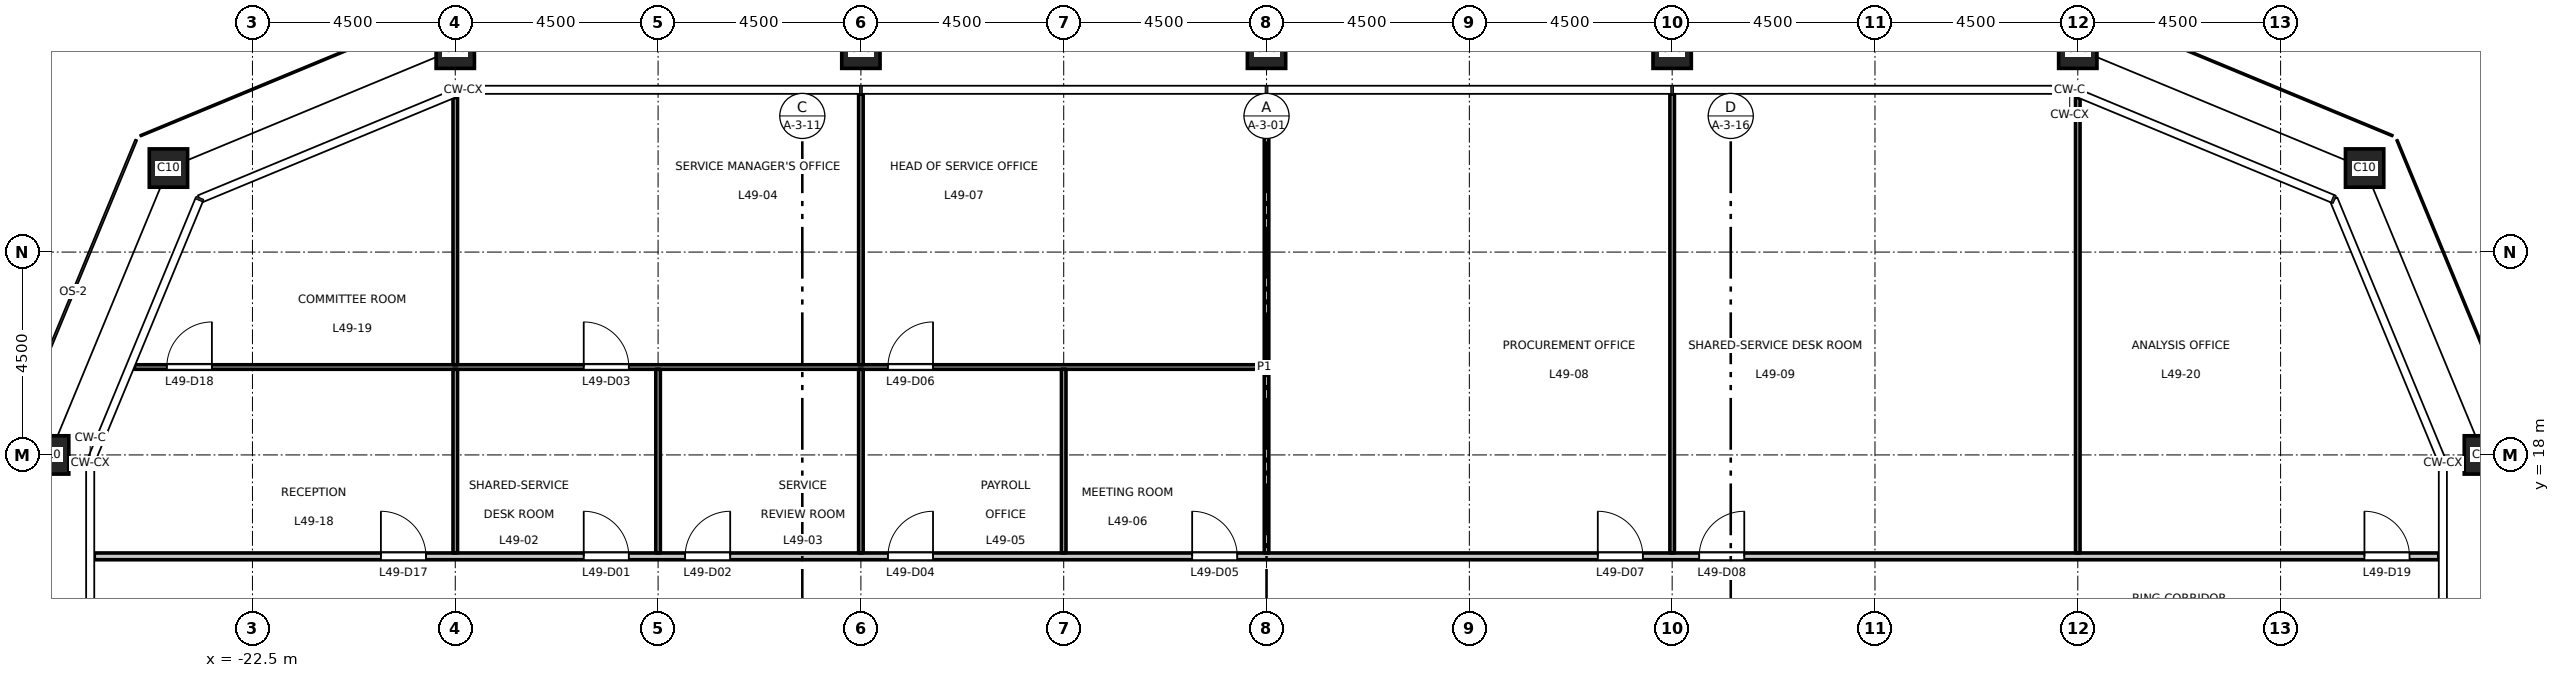
"""IFC4 building model, lengths in metres.
Left out: names, types, materials, properties, quantities, classifications, styles, units other than length and angle.
Written with IfcOpenShell. Run it as: python <this file> out.ifc"""

import sys

from ifc_helpers import new_model, si_unit, direction, frame, frame_2d, origin, origin_2d, place, context, subcontext, project, spatial, rectangle, hollow_rectangle, extrude, element, fill, save


model = new_model("IFC4")
c1 = context("Model", 3, precision=1e-05, world=origin(), true_north=direction((0.0, 1.0)))
c2 = subcontext(c1, "Body", "Model", "MODEL_VIEW")
j1 = project(units=[si_unit("LENGTHUNIT", "METRE"), si_unit("PLANEANGLEUNIT", "RADIAN")], contexts=[c1])
p1 = place(None, origin())
s1 = spatial("IfcSite", under=j1, at=p1, CompositionType="ELEMENT")
p2 = place(p1, origin())
s2 = spatial("IfcBuilding", under=s1, at=p2, CompositionType="ELEMENT")
p3 = place(p2, frame((0.0, 0.0, 228.7)))
s3 = spatial("IfcBuildingStorey", under=s2, at=p3, CompositionType="ELEMENT", Elevation=228.7)
for number, where, z_axis, x_axis in (
    (1, (27.0, 18.0, 0.0), (0.0, 0.0, 1.0), (1.0, 0.0, 0.0)),
    (2, (24.364, 24.364, 0.0), (0.0, 0.0, 1.0), (1.0, 0.0, 0.0)),
    (3, (18.0, 27.0, 0.0), (0.0, 0.0, 1.0), (1.0, 0.0, 0.0)),
    (4, (9.0, 27.0, 0.0), (0.0, 0.0, 1.0), (1.0, 0.0, 0.0)),
    (5, (0.0, 27.0, 0.0), (0.0, 0.0, 1.0), (1.0, 0.0, 0.0)),
    (6, (-9.0, 27.0, 0.0), (0.0, 0.0, 1.0), (1.0, 0.0, 0.0)),
    (7, (-18.0, 27.0, 0.0), (0.0, 0.0, 1.0), (1.0, 0.0, 0.0)),
    (8, (-24.364, 24.364, 0.0), (0.0, 0.0, 1.0), (1.0, 0.0, 0.0)),
    (9, (-27.0, 18.0, 0.0), (0.0, 0.0, 1.0), (1.0, 0.0, 0.0)),
):
    element("IfcColumn", number, at=place(p3, frame(where, z_axis=z_axis, x_axis=x_axis)), inside=s3, PredefinedType="COLUMN", context=c2, shape_type="SweptSolid", body=[
        extrude(hollow_rectangle(XDim=0.85, YDim=0.85, WallThickness=0.05, at=origin_2d()), origin(), (0.0, 0.0, 1.0), 4.5),
    ])
p4 = place(p3, frame((-26.01, 15.75, 0.0), z_axis=(0.0, 0.0, 1.0), x_axis=(1.0, 0.0, 0.0)))
e10 = element("IfcWall", 10, at=p4, inside=s3, PredefinedType="PARTITIONING", context=c2, shape_type="SweptSolid", body=[
    extrude(rectangle(XDim=52.02, YDim=0.15, at=frame_2d((26.01, 0.0))), origin(), (0.0, 0.0, 1.0), 4.35),
])
p5 = place(p4, frame((10.86, 0.0, 0.0)))
e11 = element("IfcOpeningElement", 11, at=p5, cuts=e10, PredefinedType="OPENING", context=c2, shape_type="SweptSolid", body=[
    extrude(rectangle(XDim=1.0, YDim=2.1, at=frame_2d((0.5, 1.05))), frame((0.0, 0.085, 0.0), z_axis=(0.0, -1.0, 0.0), x_axis=(1.0, 0.0, 0.0)), (0.0, 0.0, 1.0), 0.17),
])
p6 = place(p4, frame((13.11, 0.0, 0.0)))
e12 = element("IfcOpeningElement", 12, at=p6, cuts=e10, PredefinedType="OPENING", context=c2, shape_type="SweptSolid", body=[
    extrude(rectangle(XDim=1.0, YDim=2.1, at=frame_2d((0.5, 1.05))), frame((0.0, 0.085, 0.0), z_axis=(0.0, -1.0, 0.0), x_axis=(1.0, 0.0, 0.0)), (0.0, 0.0, 1.0), 0.17),
])
p7 = place(p4, frame((17.61, 0.0, 0.0)))
e13 = element("IfcOpeningElement", 13, at=p7, cuts=e10, PredefinedType="OPENING", context=c2, shape_type="SweptSolid", body=[
    extrude(rectangle(XDim=1.0, YDim=2.1, at=frame_2d((0.5, 1.05))), frame((0.0, 0.085, 0.0), z_axis=(0.0, -1.0, 0.0), x_axis=(1.0, 0.0, 0.0)), (0.0, 0.0, 1.0), 0.17),
])
p8 = place(p4, frame((24.36, 0.0, 0.0)))
e14 = element("IfcOpeningElement", 14, at=p8, cuts=e10, PredefinedType="OPENING", context=c2, shape_type="SweptSolid", body=[
    extrude(rectangle(XDim=1.0, YDim=2.1, at=frame_2d((0.5, 1.05))), frame((0.0, 0.085, 0.0), z_axis=(0.0, -1.0, 0.0), x_axis=(1.0, 0.0, 0.0)), (0.0, 0.0, 1.0), 0.17),
])
p9 = place(p4, frame((33.36, 0.0, 0.0)))
e15 = element("IfcOpeningElement", 15, at=p9, cuts=e10, PredefinedType="OPENING", context=c2, shape_type="SweptSolid", body=[
    extrude(rectangle(XDim=1.0, YDim=2.1, at=frame_2d((0.5, 1.05))), frame((0.0, 0.085, 0.0), z_axis=(0.0, -1.0, 0.0), x_axis=(1.0, 0.0, 0.0)), (0.0, 0.0, 1.0), 0.17),
])
p10 = place(p4, frame((35.61, 0.0, 0.0)))
e16 = element("IfcOpeningElement", 16, at=p10, cuts=e10, PredefinedType="OPENING", context=c2, shape_type="SweptSolid", body=[
    extrude(rectangle(XDim=1.0, YDim=2.1, at=frame_2d((0.5, 1.05))), frame((0.0, 0.085, 0.0), z_axis=(0.0, -1.0, 0.0), x_axis=(1.0, 0.0, 0.0)), (0.0, 0.0, 1.0), 0.17),
])
p11 = place(p4, frame((6.36, 0.0, 0.0)))
e17 = element("IfcOpeningElement", 17, at=p11, cuts=e10, PredefinedType="OPENING", context=c2, shape_type="SweptSolid", body=[
    extrude(rectangle(XDim=1.0, YDim=2.1, at=frame_2d((0.5, 1.05))), frame((0.0, 0.085, 0.0), z_axis=(0.0, -1.0, 0.0), x_axis=(1.0, 0.0, 0.0)), (0.0, 0.0, 1.0), 0.17),
])
p12 = place(p4, frame((50.37, 0.0, 0.0)))
e18 = element("IfcOpeningElement", 18, at=p12, cuts=e10, PredefinedType="OPENING", context=c2, shape_type="SweptSolid", body=[
    extrude(rectangle(XDim=1.0, YDim=2.1, at=frame_2d((0.5, 1.05))), frame((0.0, 0.085, 0.0), z_axis=(0.0, -1.0, 0.0), x_axis=(1.0, 0.0, 0.0)), (0.0, 0.0, 1.0), 0.17),
])
p13 = place(p3, frame((-25.121, 19.95, 0.0), z_axis=(0.0, 0.0, 1.0), x_axis=(1.0, 0.0, 0.0)))
e19 = element("IfcWall", 19, at=p13, inside=s3, PredefinedType="PARTITIONING", context=c2, shape_type="SweptSolid", body=[
    extrude(rectangle(XDim=25.071, YDim=0.1, at=frame_2d((12.536, 0.0))), origin(), (0.0, 0.0, 1.0), 4.35),
])
p14 = place(p13, frame((9.971, 0.0, 0.0)))
e20 = element("IfcOpeningElement", 20, at=p14, cuts=e19, PredefinedType="OPENING", context=c2, shape_type="SweptSolid", body=[
    extrude(rectangle(XDim=1.0, YDim=2.1, at=frame_2d((0.5, 1.05))), frame((0.0, 0.06, 0.0), z_axis=(0.0, -1.0, 0.0), x_axis=(1.0, 0.0, 0.0)), (0.0, 0.0, 1.0), 0.12),
])
p15 = place(p13, frame((16.721, 0.0, 0.0)))
e21 = element("IfcOpeningElement", 21, at=p15, cuts=e19, PredefinedType="OPENING", context=c2, shape_type="SweptSolid", body=[
    extrude(rectangle(XDim=1.0, YDim=2.1, at=frame_2d((0.5, 1.05))), frame((0.0, 0.06, 0.0), z_axis=(0.0, -1.0, 0.0), x_axis=(1.0, 0.0, 0.0)), (0.0, 0.0, 1.0), 0.12),
])
p16 = place(p13, frame((0.721, 0.0, 0.0)))
e22 = element("IfcOpeningElement", 22, at=p16, cuts=e19, PredefinedType="OPENING", context=c2, shape_type="SweptSolid", body=[
    extrude(rectangle(XDim=1.0, YDim=2.1, at=frame_2d((0.5, 1.05))), frame((0.0, 0.06, 0.0), z_axis=(0.0, -1.0, 0.0), x_axis=(1.0, 0.0, 0.0)), (0.0, 0.0, 1.0), 0.12),
])
p17 = place(p3, frame((-18.0, 15.825, 0.0), z_axis=(0.0, 0.0, 1.0), x_axis=(0.0, 1.0, 0.0)))
e23 = element("IfcWall", 23, at=p17, inside=s3, PredefinedType="PARTITIONING", context=c2, shape_type="SweptSolid", body=[
    extrude(rectangle(XDim=4.075, YDim=0.1, at=frame_2d((2.038, 0.0))), origin(), (0.0, 0.0, 1.0), 3.65),
])
p18 = place(p3, frame((-18.0, 20.0, 0.0), z_axis=(0.0, 0.0, 1.0), x_axis=(0.0, 1.0, 0.0)))
e24 = element("IfcWall", 24, at=p18, inside=s3, PredefinedType="PARTITIONING", context=c2, shape_type="SweptSolid", body=[
    extrude(rectangle(XDim=5.928, YDim=0.1, at=frame_2d((2.964, 0.0))), origin(), (0.0, 0.0, 1.0), 3.65),
])
p19 = place(p3, frame((-13.5, 15.825, 0.0), z_axis=(0.0, 0.0, 1.0), x_axis=(0.0, 1.0, 0.0)))
e25 = element("IfcWall", 25, at=p19, inside=s3, PredefinedType="PARTITIONING", context=c2, shape_type="SweptSolid", body=[
    extrude(rectangle(XDim=4.075, YDim=0.1, at=frame_2d((2.038, 0.0))), origin(), (0.0, 0.0, 1.0), 4.35),
])
p20 = place(p3, frame((-9.0, 15.825, 0.0), z_axis=(0.0, 0.0, 1.0), x_axis=(0.0, 1.0, 0.0)))
e26 = element("IfcWall", 26, at=p20, inside=s3, PredefinedType="PARTITIONING", context=c2, shape_type="SweptSolid", body=[
    extrude(rectangle(XDim=4.075, YDim=0.1, at=frame_2d((2.038, 0.0))), origin(), (0.0, 0.0, 1.0), 3.65),
])
p21 = place(p3, frame((-9.0, 20.0, 0.0), z_axis=(0.0, 0.0, 1.0), x_axis=(0.0, 1.0, 0.0)))
e27 = element("IfcWall", 27, at=p21, inside=s3, PredefinedType="PARTITIONING", context=c2, shape_type="SweptSolid", body=[
    extrude(rectangle(XDim=6.01, YDim=0.1, at=frame_2d((3.005, 0.0))), origin(), (0.0, 0.0, 1.0), 3.65),
])
p22 = place(p3, frame((-4.5, 15.825, 0.0), z_axis=(0.0, 0.0, 1.0), x_axis=(0.0, 1.0, 0.0)))
e28 = element("IfcWall", 28, at=p22, inside=s3, PredefinedType="PARTITIONING", context=c2, shape_type="SweptSolid", body=[
    extrude(rectangle(XDim=4.075, YDim=0.1, at=frame_2d((2.038, 0.0))), origin(), (0.0, 0.0, 1.0), 4.35),
])
p23 = place(p3, frame((0.0, 15.825, 0.0), z_axis=(0.0, 0.0, 1.0), x_axis=(0.0, 1.0, 0.0)))
e29 = element("IfcWall", 29, at=p23, inside=s3, PredefinedType="PARTITIONING", context=c2, shape_type="SweptSolid", body=[
    extrude(rectangle(XDim=10.185, YDim=0.1, at=frame_2d((5.093, 0.0))), origin(), (0.0, 0.0, 1.0), 3.55),
])
p24 = place(p3, frame((9.0, 15.825, 0.0), z_axis=(0.0, 0.0, 1.0), x_axis=(0.0, 1.0, 0.0)))
e30 = element("IfcWall", 30, at=p24, inside=s3, PredefinedType="PARTITIONING", context=c2, shape_type="SweptSolid", body=[
    extrude(rectangle(XDim=10.185, YDim=0.1, at=frame_2d((5.093, 0.0))), origin(), (0.0, 0.0, 1.0), 3.65),
])
p25 = place(p3, frame((18.0, 15.825, 0.0), z_axis=(0.0, 0.0, 1.0), x_axis=(0.0, 1.0, 0.0)))
e31 = element("IfcWall", 31, at=p25, inside=s3, PredefinedType="PARTITIONING", context=c2, shape_type="SweptSolid", body=[
    extrude(rectangle(XDim=10.103, YDim=0.1, at=frame_2d((5.052, 0.0))), origin(), (0.0, 0.0, 1.0), 3.65),
])
p26 = place(p5, origin())
e32 = element("IfcDoor", 32, at=p26, inside=s3, OperationType="SINGLE_SWING_LEFT", PredefinedType="DOOR", context=c2, shape_type="SweptSolid", body=[
    extrude(rectangle(XDim=1.0, YDim=2.1, at=frame_2d((0.5, 1.05))), frame((0.0, 0.025, 0.0), z_axis=(0.0, -1.0, 0.0), x_axis=(1.0, 0.0, 0.0)), (0.0, 0.0, 1.0), 0.05),
])
fill(e11, e32)
p27 = place(p6, origin())
e33 = element("IfcDoor", 33, at=p27, inside=s3, OperationType="SINGLE_SWING_RIGHT", PredefinedType="DOOR", context=c2, shape_type="SweptSolid", body=[
    extrude(rectangle(XDim=1.0, YDim=2.1, at=frame_2d((0.5, 1.05))), frame((0.0, 0.025, 0.0), z_axis=(0.0, -1.0, 0.0), x_axis=(1.0, 0.0, 0.0)), (0.0, 0.0, 1.0), 0.05),
])
fill(e12, e33)
p28 = place(p14, origin())
e34 = element("IfcDoor", 34, at=p28, inside=s3, OperationType="SINGLE_SWING_LEFT", PredefinedType="DOOR", context=c2, shape_type="SweptSolid", body=[
    extrude(rectangle(XDim=1.0, YDim=2.1, at=frame_2d((0.5, 1.05))), frame((0.0, 0.025, 0.0), z_axis=(0.0, -1.0, 0.0), x_axis=(1.0, 0.0, 0.0)), (0.0, 0.0, 1.0), 0.05),
])
fill(e20, e34)
p29 = place(p7, origin())
e35 = element("IfcDoor", 35, at=p29, inside=s3, OperationType="SINGLE_SWING_RIGHT", PredefinedType="DOOR", context=c2, shape_type="SweptSolid", body=[
    extrude(rectangle(XDim=1.0, YDim=2.1, at=frame_2d((0.5, 1.05))), frame((0.0, 0.025, 0.0), z_axis=(0.0, -1.0, 0.0), x_axis=(1.0, 0.0, 0.0)), (0.0, 0.0, 1.0), 0.05),
])
fill(e13, e35)
p30 = place(p8, origin())
e36 = element("IfcDoor", 36, at=p30, inside=s3, OperationType="SINGLE_SWING_LEFT", PredefinedType="DOOR", context=c2, shape_type="SweptSolid", body=[
    extrude(rectangle(XDim=1.0, YDim=2.1, at=frame_2d((0.5, 1.05))), frame((0.0, 0.025, 0.0), z_axis=(0.0, -1.0, 0.0), x_axis=(1.0, 0.0, 0.0)), (0.0, 0.0, 1.0), 0.05),
])
fill(e14, e36)
p31 = place(p15, origin())
e37 = element("IfcDoor", 37, at=p31, inside=s3, OperationType="SINGLE_SWING_RIGHT", PredefinedType="DOOR", context=c2, shape_type="SweptSolid", body=[
    extrude(rectangle(XDim=1.0, YDim=2.1, at=frame_2d((0.5, 1.05))), frame((0.0, 0.025, 0.0), z_axis=(0.0, -1.0, 0.0), x_axis=(1.0, 0.0, 0.0)), (0.0, 0.0, 1.0), 0.05),
])
fill(e21, e37)
p32 = place(p9, origin())
e38 = element("IfcDoor", 38, at=p32, inside=s3, OperationType="SINGLE_SWING_LEFT", PredefinedType="DOOR", context=c2, shape_type="SweptSolid", body=[
    extrude(rectangle(XDim=1.0, YDim=2.1, at=frame_2d((0.5, 1.05))), frame((0.0, 0.025, 0.0), z_axis=(0.0, -1.0, 0.0), x_axis=(1.0, 0.0, 0.0)), (0.0, 0.0, 1.0), 0.05),
])
fill(e15, e38)
p33 = place(p10, origin())
e39 = element("IfcDoor", 39, at=p33, inside=s3, OperationType="SINGLE_SWING_RIGHT", PredefinedType="DOOR", context=c2, shape_type="SweptSolid", body=[
    extrude(rectangle(XDim=1.0, YDim=2.1, at=frame_2d((0.5, 1.05))), frame((0.0, 0.025, 0.0), z_axis=(0.0, -1.0, 0.0), x_axis=(1.0, 0.0, 0.0)), (0.0, 0.0, 1.0), 0.05),
])
fill(e16, e39)
p34 = place(p11, origin())
e40 = element("IfcDoor", 40, at=p34, inside=s3, OperationType="SINGLE_SWING_LEFT", PredefinedType="DOOR", context=c2, shape_type="SweptSolid", body=[
    extrude(rectangle(XDim=1.0, YDim=2.1, at=frame_2d((0.5, 1.05))), frame((0.0, 0.025, 0.0), z_axis=(0.0, -1.0, 0.0), x_axis=(1.0, 0.0, 0.0)), (0.0, 0.0, 1.0), 0.05),
])
fill(e17, e40)
p35 = place(p16, origin())
e41 = element("IfcDoor", 41, at=p35, inside=s3, OperationType="SINGLE_SWING_RIGHT", PredefinedType="DOOR", context=c2, shape_type="SweptSolid", body=[
    extrude(rectangle(XDim=1.0, YDim=2.1, at=frame_2d((0.5, 1.05))), frame((0.0, 0.025, 0.0), z_axis=(0.0, -1.0, 0.0), x_axis=(1.0, 0.0, 0.0)), (0.0, 0.0, 1.0), 0.05),
])
fill(e22, e41)
p36 = place(p12, origin())
e42 = element("IfcDoor", 42, at=p36, inside=s3, OperationType="SINGLE_SWING_LEFT", PredefinedType="DOOR", context=c2, shape_type="SweptSolid", body=[
    extrude(rectangle(XDim=1.0, YDim=2.1, at=frame_2d((0.5, 1.05))), frame((0.0, 0.025, 0.0), z_axis=(0.0, -1.0, 0.0), x_axis=(1.0, 0.0, 0.0)), (0.0, 0.0, 1.0), 0.05),
])
fill(e18, e42)
save(model, sys.argv[1])
